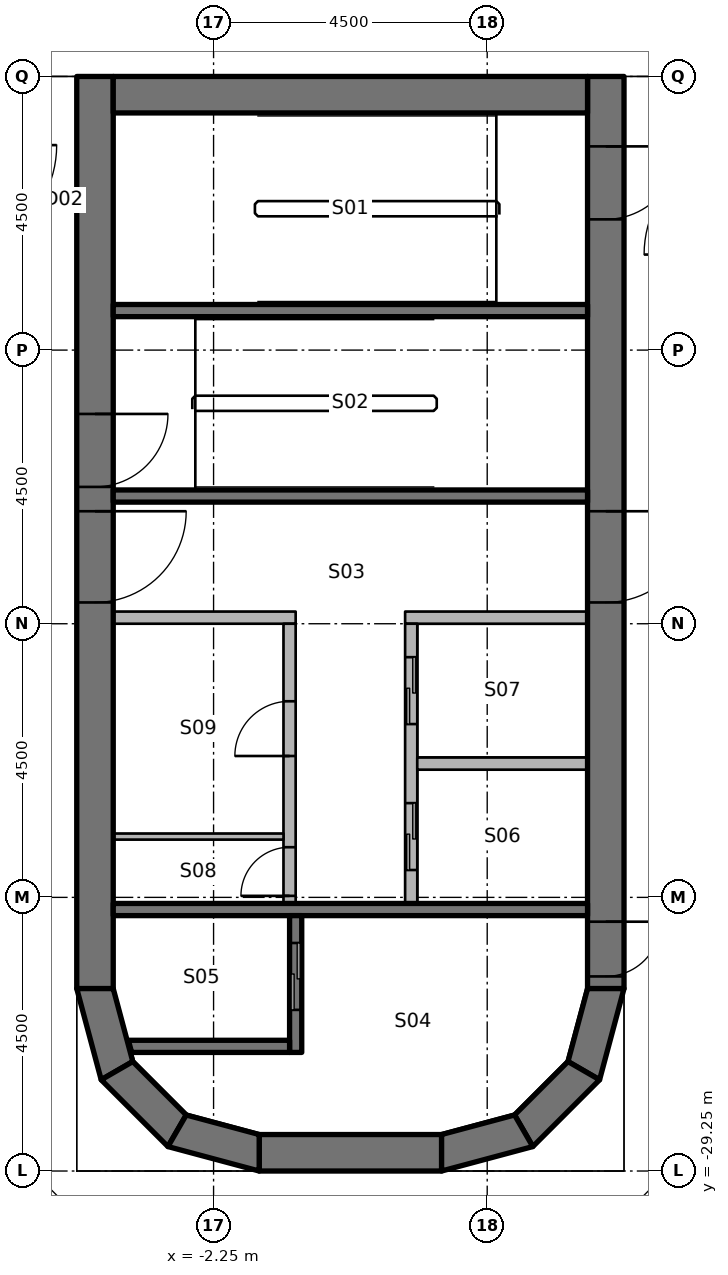
"""IFC4 building model, lengths in metres.
Left out: names, types, materials, properties, quantities, classifications, styles, units other than length and angle.
Written with IfcOpenShell. Run it as: python <this file> out.ifc"""

import sys

from ifc_helpers import new_model, si_unit, direction, frame, frame_2d, origin, place, context, subcontext, project, spatial, polyline, rectangle, outline, extrude, element, fill, save


model = new_model("IFC4")
c1 = context("Model", 3, precision=1e-05, world=origin(), true_north=direction((0.0, 1.0)))
c2 = subcontext(c1, "Body", "Model", "MODEL_VIEW")
j1 = project(units=[si_unit("LENGTHUNIT", "METRE"), si_unit("PLANEANGLEUNIT", "RADIAN")], contexts=[c1])
p1 = place(None, origin())
s1 = spatial("IfcSite", under=j1, at=p1, CompositionType="ELEMENT")
p2 = place(p1, origin())
s2 = spatial("IfcBuilding", under=s1, at=p2, CompositionType="ELEMENT")
p3 = place(p2, frame((0.0, 0.0, 244.8)))
s3 = spatial("IfcBuildingStorey", under=s2, at=p3, CompositionType="ELEMENT", Elevation=244.8)
p4 = place(p3, frame((-4.2, -11.25, 0.0), z_axis=(0.0, 0.0, 1.0), x_axis=(0.0, -1.0, 0.0)))
e1 = element("IfcWall", 1, at=p4, inside=s3, PredefinedType="SHEAR", context=c2, shape_type="SweptSolid", body=[
    extrude(rectangle(XDim=15.0, YDim=0.6, at=frame_2d((7.5, 0.0))), origin(), (0.0, 0.0, 1.0), 5.0),
])
p5 = place(p4, frame((7.15, 0.0, 0.0)))
e2 = element("IfcOpeningElement", 2, at=p5, cuts=e1, PredefinedType="OPENING", context=c2, shape_type="SweptSolid", body=[
    extrude(rectangle(XDim=1.5, YDim=2.3, at=frame_2d((0.75, 1.15))), frame((0.0, 0.31, 0.0), z_axis=(0.0, -1.0, 0.0), x_axis=(1.0, 0.0, 0.0)), (0.0, 0.0, 1.0), 0.62),
])
p6 = place(p4, frame((5.55, 0.0, 0.0)))
e3 = element("IfcOpeningElement", 3, at=p6, cuts=e1, PredefinedType="OPENING", context=c2, shape_type="SweptSolid", body=[
    extrude(rectangle(XDim=1.2, YDim=2.1, at=frame_2d((0.6, 1.05))), frame((0.0, 0.31, 0.0), z_axis=(0.0, -1.0, 0.0), x_axis=(1.0, 0.0, 0.0)), (0.0, 0.0, 1.0), 0.62),
])
p7 = place(p3, frame((4.2, -11.25, 0.0), z_axis=(0.0, 0.0, 1.0), x_axis=(0.0, -1.0, 0.0)))
e4 = element("IfcWall", 4, at=p7, inside=s3, PredefinedType="SHEAR", context=c2, shape_type="SweptSolid", body=[
    extrude(rectangle(XDim=15.0, YDim=0.6, at=frame_2d((7.5, 0.0))), origin(), (0.0, 0.0, 1.0), 5.0),
])
p8 = place(p7, frame((7.15, 0.0, 0.0)))
e5 = element("IfcOpeningElement", 5, at=p8, cuts=e4, PredefinedType="OPENING", context=c2, shape_type="SweptSolid", body=[
    extrude(rectangle(XDim=1.5, YDim=2.3, at=frame_2d((0.75, 1.15))), frame((0.0, 0.31, 0.0), z_axis=(0.0, -1.0, 0.0), x_axis=(1.0, 0.0, 0.0)), (0.0, 0.0, 1.0), 0.62),
])
p9 = place(p7, frame((13.9, 0.0, 0.0)))
e6 = element("IfcOpeningElement", 6, at=p9, cuts=e4, PredefinedType="OPENING", context=c2, shape_type="SweptSolid", body=[
    extrude(rectangle(XDim=0.9, YDim=2.1, at=frame_2d((0.45, 1.05))), frame((0.0, 0.31, 0.0), z_axis=(0.0, -1.0, 0.0), x_axis=(1.0, 0.0, 0.0)), (0.0, 0.0, 1.0), 0.62),
])
p10 = place(p7, frame((1.15, 0.0, 0.0)))
e7 = element("IfcOpeningElement", 7, at=p10, cuts=e4, PredefinedType="OPENING", context=c2, shape_type="SweptSolid", body=[
    extrude(rectangle(XDim=1.2, YDim=2.1, at=frame_2d((0.6, 1.05))), frame((0.0, 0.31, 0.0), z_axis=(0.0, -1.0, 0.0), x_axis=(1.0, 0.0, 0.0)), (0.0, 0.0, 1.0), 0.62),
])
p11 = place(p3, frame((-3.9, -11.55, 0.0), z_axis=(0.0, 0.0, 1.0), x_axis=(1.0, 0.0, 0.0)))
e8 = element("IfcWall", 8, at=p11, inside=s3, PredefinedType="SHEAR", context=c2, shape_type="SweptSolid", body=[
    extrude(rectangle(XDim=7.8, YDim=0.6, at=frame_2d((3.9, 0.0))), origin(), (0.0, 0.0, 1.0), 5.0),
])
p12 = place(p3, frame((-1.5, -28.95, 0.0), z_axis=(0.0, 0.0, 1.0), x_axis=(1.0, 0.0, 0.0)))
e9 = element("IfcWall", 9, at=p12, inside=s3, PredefinedType="SHEAR", context=c2, shape_type="SweptSolid", body=[
    extrude(rectangle(XDim=3.0, YDim=0.6, at=frame_2d((1.5, 0.0))), origin(), (0.0, 0.0, 1.0), 5.0),
])
p13 = place(p3, origin())
e10 = element("IfcWall", 10, at=p13, inside=s3, PredefinedType="SHEAR", context=c2, shape_type="SweptSolid", body=[
    extrude(outline(polyline([(-4.5, -26.25), (-4.098, -27.75), (-3.579, -27.45), (-3.9, -26.25), (-4.5, -26.25)])), origin(), (0.0, 0.0, 1.0), 5.0),
])
p14 = place(p3, origin())
e11 = element("IfcWall", 11, at=p14, inside=s3, PredefinedType="SHEAR", context=c2, shape_type="SweptSolid", body=[
    extrude(outline(polyline([(-4.098, -27.75), (-3.0, -28.848), (-2.7, -28.329), (-3.579, -27.45), (-4.098, -27.75)])), origin(), (0.0, 0.0, 1.0), 5.0),
])
p15 = place(p3, origin())
e12 = element("IfcWall", 12, at=p15, inside=s3, PredefinedType="SHEAR", context=c2, shape_type="SweptSolid", body=[
    extrude(outline(polyline([(-3.0, -28.848), (-1.5, -29.25), (-1.5, -28.65), (-2.7, -28.329), (-3.0, -28.848)])), origin(), (0.0, 0.0, 1.0), 5.0),
])
p16 = place(p3, origin())
e13 = element("IfcWall", 13, at=p16, inside=s3, PredefinedType="SHEAR", context=c2, shape_type="SweptSolid", body=[
    extrude(outline(polyline([(4.5, -26.25), (4.098, -27.75), (3.579, -27.45), (3.9, -26.25), (4.5, -26.25)])), origin(), (0.0, 0.0, 1.0), 5.0),
])
p17 = place(p3, origin())
e14 = element("IfcWall", 14, at=p17, inside=s3, PredefinedType="SHEAR", context=c2, shape_type="SweptSolid", body=[
    extrude(outline(polyline([(4.098, -27.75), (3.0, -28.848), (2.7, -28.329), (3.579, -27.45), (4.098, -27.75)])), origin(), (0.0, 0.0, 1.0), 5.0),
])
p18 = place(p3, origin())
e15 = element("IfcWall", 15, at=p18, inside=s3, PredefinedType="SHEAR", context=c2, shape_type="SweptSolid", body=[
    extrude(outline(polyline([(3.0, -28.848), (1.5, -29.25), (1.5, -28.65), (2.7, -28.329), (3.0, -28.848)])), origin(), (0.0, 0.0, 1.0), 5.0),
])
p19 = place(p3, origin())
e16 = element("IfcWall", 16, at=p19, inside=s3, PredefinedType="SOLIDWALL", context=c2, shape_type="SweptSolid", body=[
    extrude(outline(polyline([(4.49, -30.879), (6.129, -29.24), (5.95, -29.136), (4.386, -30.7), (4.49, -30.879)])), origin(), (0.0, 0.0, 1.0), 4.85),
])
p20 = place(p3, origin())
e17 = element("IfcWall", 17, at=p20, inside=s3, PredefinedType="SOLIDWALL", context=c2, shape_type="SweptSolid", body=[
    extrude(outline(polyline([(-6.129, -29.24), (-4.49, -30.879), (-4.386, -30.7), (-5.95, -29.136), (-6.129, -29.24)])), origin(), (0.0, 0.0, 1.0), 4.85),
])
p21 = place(p3, frame((3.9, -24.95, 0.0), z_axis=(0.0, 0.0, 1.0), x_axis=(-1.0, 0.0, 0.0)))
e18 = element("IfcWall", 18, at=p21, inside=s3, PredefinedType="SHEAR", context=c2, shape_type="SweptSolid", body=[
    extrude(rectangle(XDim=7.8, YDim=0.2, at=frame_2d((3.9, 0.0))), origin(), (0.0, 0.0, 1.0), 4.85),
])
p22 = place(p3, frame((-0.9, -27.3, 0.0), z_axis=(0.0, 0.0, 1.0), x_axis=(0.0, 1.0, 0.0)))
e19 = element("IfcWall", 19, at=p22, inside=s3, PredefinedType="SHEAR", context=c2, shape_type="SweptSolid", body=[
    extrude(rectangle(XDim=2.25, YDim=0.2, at=frame_2d((1.125, 0.0))), origin(), (0.0, 0.0, 1.0), 4.85),
])
p23 = place(p22, frame((0.7, 0.0, 0.0)))
e20 = element("IfcOpeningElement", 20, at=p23, cuts=e19, PredefinedType="OPENING", context=c2, shape_type="SweptSolid", body=[
    extrude(rectangle(XDim=1.1, YDim=2.3, at=frame_2d((0.55, 1.15))), frame((0.0, 0.11, 0.0), z_axis=(0.0, -1.0, 0.0), x_axis=(1.0, 0.0, 0.0)), (0.0, 0.0, 1.0), 0.22),
])
p24 = place(p3, origin())
e21 = element("IfcWall", 21, at=p24, inside=s3, PredefinedType="SHEAR", context=c2, shape_type="SweptSolid", body=[
    extrude(outline(polyline([(-1.0, -27.1), (-3.651, -27.1), (-3.597, -27.3), (-1.0, -27.3), (-1.0, -27.1)])), origin(), (0.0, 0.0, 1.0), 4.85),
])
for number, where, z_axis, x_axis in (
    (22, (3.9, -18.15, 0.0), (0.0, 0.0, 1.0), (-1.0, 0.0, 0.0)),
    (23, (3.9, -15.1, 0.0), (0.0, 0.0, 1.0), (-1.0, 0.0, 0.0)),
):
    element("IfcWall", number, at=place(p3, frame(where, z_axis=z_axis, x_axis=x_axis)), inside=s3, PredefinedType="SHEAR", context=c2, shape_type="SweptSolid", body=[
        extrude(rectangle(XDim=7.8, YDim=0.2, at=frame_2d((3.9, 0.0))), origin(), (0.0, 0.0, 1.0), 4.85),
    ])
p25 = place(p3, frame((3.9, -20.15, 0.0), z_axis=(0.0, 0.0, 1.0), x_axis=(-1.0, 0.0, 0.0)))
e24 = element("IfcWall", 24, at=p25, inside=s3, PredefinedType="PARTITIONING", context=c2, shape_type="SweptSolid", body=[
    extrude(rectangle(XDim=3.0, YDim=0.2, at=frame_2d((1.5, 0.0))), origin(), (0.0, 0.0, 1.0), 4.85),
])
p26 = place(p3, frame((1.0, -24.85, 0.0), z_axis=(0.0, 0.0, 1.0), x_axis=(0.0, 1.0, 0.0)))
e25 = element("IfcWall", 25, at=p26, inside=s3, PredefinedType="PARTITIONING", context=c2, shape_type="SweptSolid", body=[
    extrude(rectangle(XDim=4.6, YDim=0.2, at=frame_2d((2.3, 0.0))), origin(), (0.0, 0.0, 1.0), 4.85),
])
p27 = place(p26, frame((0.55, 0.0, 0.0)))
e26 = element("IfcOpeningElement", 26, at=p27, cuts=e25, PredefinedType="OPENING", context=c2, shape_type="SweptSolid", body=[
    extrude(rectangle(XDim=1.1, YDim=2.3, at=frame_2d((0.55, 1.15))), frame((0.0, 0.11, 0.0), z_axis=(0.0, -1.0, 0.0), x_axis=(1.0, 0.0, 0.0)), (0.0, 0.0, 1.0), 0.22),
])
p28 = place(p26, frame((2.95, 0.0, 0.0)))
e27 = element("IfcOpeningElement", 27, at=p28, cuts=e25, PredefinedType="OPENING", context=c2, shape_type="SweptSolid", body=[
    extrude(rectangle(XDim=1.1, YDim=2.3, at=frame_2d((0.55, 1.15))), frame((0.0, 0.11, 0.0), z_axis=(0.0, -1.0, 0.0), x_axis=(1.0, 0.0, 0.0)), (0.0, 0.0, 1.0), 0.22),
])
p29 = place(p3, frame((-0.9, -20.15, 0.0), z_axis=(0.0, 0.0, 1.0), x_axis=(-1.0, 0.0, 0.0)))
e28 = element("IfcWall", 28, at=p29, inside=s3, PredefinedType="PARTITIONING", context=c2, shape_type="SweptSolid", body=[
    extrude(rectangle(XDim=3.0, YDim=0.2, at=frame_2d((1.5, 0.0))), origin(), (0.0, 0.0, 1.0), 4.85),
])
p30 = place(p3, frame((-1.0, -24.85, 0.0), z_axis=(0.0, 0.0, 1.0), x_axis=(0.0, 1.0, 0.0)))
e29 = element("IfcWall", 29, at=p30, inside=s3, PredefinedType="PARTITIONING", context=c2, shape_type="SweptSolid", body=[
    extrude(rectangle(XDim=4.6, YDim=0.2, at=frame_2d((2.3, 0.0))), origin(), (0.0, 0.0, 1.0), 4.85),
])
p31 = place(p30, frame((0.125, 0.0, 0.0)))
e30 = element("IfcOpeningElement", 30, at=p31, cuts=e29, PredefinedType="OPENING", context=c2, shape_type="SweptSolid", body=[
    extrude(rectangle(XDim=0.8, YDim=2.1, at=frame_2d((0.4, 1.05))), frame((0.0, 0.11, 0.0), z_axis=(0.0, -1.0, 0.0), x_axis=(1.0, 0.0, 0.0)), (0.0, 0.0, 1.0), 0.22),
])
p32 = place(p30, frame((2.425, 0.0, 0.0)))
e31 = element("IfcOpeningElement", 31, at=p32, cuts=e29, PredefinedType="OPENING", context=c2, shape_type="SweptSolid", body=[
    extrude(rectangle(XDim=0.9, YDim=2.1, at=frame_2d((0.45, 1.05))), frame((0.0, 0.11, 0.0), z_axis=(0.0, -1.0, 0.0), x_axis=(1.0, 0.0, 0.0)), (0.0, 0.0, 1.0), 0.22),
])
p33 = place(p3, frame((3.9, -22.55, 0.0), z_axis=(0.0, 0.0, 1.0), x_axis=(-1.0, 0.0, 0.0)))
e32 = element("IfcWall", 32, at=p33, inside=s3, PredefinedType="PARTITIONING", context=c2, shape_type="SweptSolid", body=[
    extrude(rectangle(XDim=2.8, YDim=0.2, at=frame_2d((1.4, 0.0))), origin(), (0.0, 0.0, 1.0), 4.85),
])
p34 = place(p3, frame((-1.1, -23.75, 0.0), z_axis=(0.0, 0.0, 1.0), x_axis=(-1.0, 0.0, 0.0)))
e33 = element("IfcWall", 33, at=p34, inside=s3, PredefinedType="PARTITIONING", context=c2, shape_type="SweptSolid", body=[
    extrude(rectangle(XDim=2.8, YDim=0.1, at=frame_2d((1.4, 0.0))), origin(), (0.0, 0.0, 1.0), 4.85),
])
p35 = place(p8, origin())
e34 = element("IfcDoor", 34, at=p35, inside=s3, OperationType="DOUBLE_DOOR_SINGLE_SWING", PredefinedType="DOOR", context=c2, shape_type="SweptSolid", body=[
    extrude(rectangle(XDim=1.5, YDim=2.3, at=frame_2d((0.75, 1.15))), frame((0.0, 0.025, 0.0), z_axis=(0.0, -1.0, 0.0), x_axis=(1.0, 0.0, 0.0)), (0.0, 0.0, 1.0), 0.05),
])
fill(e5, e34)
p36 = place(p5, origin())
e35 = element("IfcDoor", 35, at=p36, inside=s3, OperationType="DOUBLE_DOOR_SINGLE_SWING", PredefinedType="DOOR", context=c2, shape_type="SweptSolid", body=[
    extrude(rectangle(XDim=1.5, YDim=2.3, at=frame_2d((0.75, 1.15))), frame((0.0, 0.025, 0.0), z_axis=(0.0, -1.0, 0.0), x_axis=(1.0, 0.0, 0.0)), (0.0, 0.0, 1.0), 0.05),
])
fill(e2, e35)
p37 = place(p9, origin())
e36 = element("IfcDoor", 36, at=p37, inside=s3, OperationType="SINGLE_SWING_LEFT", PredefinedType="DOOR", context=c2, shape_type="SweptSolid", body=[
    extrude(rectangle(XDim=0.9, YDim=2.1, at=frame_2d((0.45, 1.05))), frame((0.0, 0.025, 0.0), z_axis=(0.0, -1.0, 0.0), x_axis=(1.0, 0.0, 0.0)), (0.0, 0.0, 1.0), 0.05),
])
fill(e6, e36)
p38 = place(p6, origin())
e37 = element("IfcDoor", 37, at=p38, inside=s3, OperationType="SINGLE_SWING_LEFT", PredefinedType="DOOR", context=c2, shape_type="SweptSolid", body=[
    extrude(rectangle(XDim=1.2, YDim=2.1, at=frame_2d((0.6, 1.05))), frame((0.0, 0.025, 0.0), z_axis=(0.0, -1.0, 0.0), x_axis=(1.0, 0.0, 0.0)), (0.0, 0.0, 1.0), 0.05),
])
fill(e3, e37)
p39 = place(p10, origin())
e38 = element("IfcDoor", 38, at=p39, inside=s3, OperationType="SINGLE_SWING_LEFT", PredefinedType="DOOR", context=c2, shape_type="SweptSolid", body=[
    extrude(rectangle(XDim=1.2, YDim=2.1, at=frame_2d((0.6, 1.05))), frame((0.0, 0.025, 0.0), z_axis=(0.0, -1.0, 0.0), x_axis=(1.0, 0.0, 0.0)), (0.0, 0.0, 1.0), 0.05),
])
fill(e7, e38)
p40 = place(p23, origin())
e39 = element("IfcDoor", 39, at=p40, inside=s3, OperationType="DOUBLE_DOOR_SLIDING", PredefinedType="DOOR", context=c2, shape_type="SweptSolid", body=[
    extrude(rectangle(XDim=1.1, YDim=2.3, at=frame_2d((0.55, 1.15))), frame((0.0, 0.025, 0.0), z_axis=(0.0, -1.0, 0.0), x_axis=(1.0, 0.0, 0.0)), (0.0, 0.0, 1.0), 0.05),
])
fill(e20, e39)
p41 = place(p27, origin())
e40 = element("IfcDoor", 40, at=p41, inside=s3, OperationType="DOUBLE_DOOR_SLIDING", PredefinedType="DOOR", context=c2, shape_type="SweptSolid", body=[
    extrude(rectangle(XDim=1.1, YDim=2.3, at=frame_2d((0.55, 1.15))), frame((0.0, 0.025, 0.0), z_axis=(0.0, -1.0, 0.0), x_axis=(1.0, 0.0, 0.0)), (0.0, 0.0, 1.0), 0.05),
])
fill(e26, e40)
p42 = place(p28, origin())
e41 = element("IfcDoor", 41, at=p42, inside=s3, OperationType="DOUBLE_DOOR_SLIDING", PredefinedType="DOOR", context=c2, shape_type="SweptSolid", body=[
    extrude(rectangle(XDim=1.1, YDim=2.3, at=frame_2d((0.55, 1.15))), frame((0.0, 0.025, 0.0), z_axis=(0.0, -1.0, 0.0), x_axis=(1.0, 0.0, 0.0)), (0.0, 0.0, 1.0), 0.05),
])
fill(e27, e41)
p43 = place(p31, origin())
e42 = element("IfcDoor", 42, at=p43, inside=s3, OperationType="SINGLE_SWING_LEFT", PredefinedType="DOOR", context=c2, shape_type="SweptSolid", body=[
    extrude(rectangle(XDim=0.8, YDim=2.1, at=frame_2d((0.4, 1.05))), frame((0.0, 0.025, 0.0), z_axis=(0.0, -1.0, 0.0), x_axis=(1.0, 0.0, 0.0)), (0.0, 0.0, 1.0), 0.05),
])
fill(e30, e42)
p44 = place(p32, origin())
e43 = element("IfcDoor", 43, at=p44, inside=s3, OperationType="SINGLE_SWING_LEFT", PredefinedType="DOOR", context=c2, shape_type="SweptSolid", body=[
    extrude(rectangle(XDim=0.9, YDim=2.1, at=frame_2d((0.45, 1.05))), frame((0.0, 0.025, 0.0), z_axis=(0.0, -1.0, 0.0), x_axis=(1.0, 0.0, 0.0)), (0.0, 0.0, 1.0), 0.05),
])
fill(e31, e43)
save(model, sys.argv[1])
